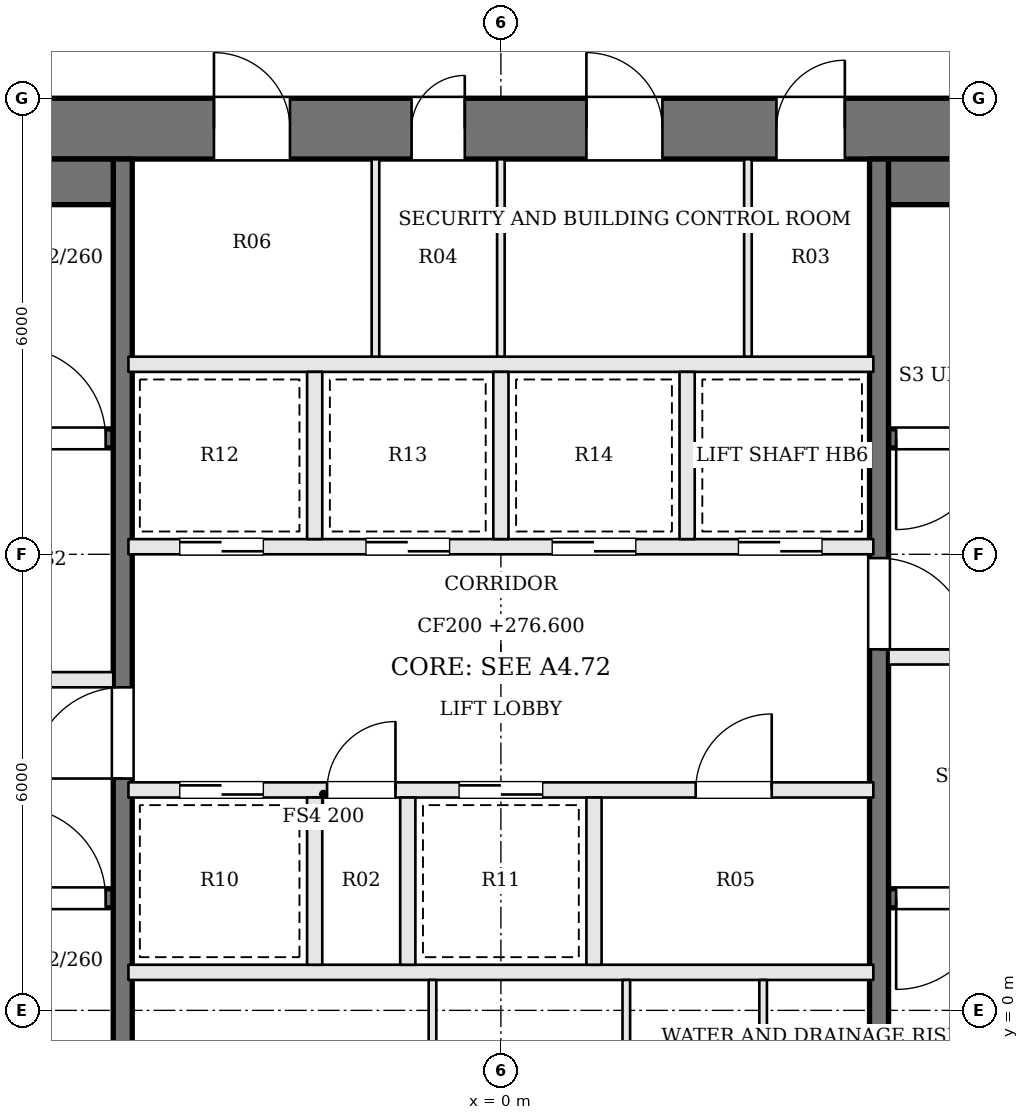
"""IFC4 building model, lengths in metres.
Left out: names, types, materials, properties, quantities, classifications, styles, units other than length and angle.
Written with IfcOpenShell. Run it as: python <this file> out.ifc"""

import sys

from ifc_helpers import new_model, si_unit, direction, frame, frame_2d, origin, place, context, subcontext, project, spatial, rectangle, extrude, element, fill, save


model = new_model("IFC4")
c1 = context("Model", 3, precision=1e-05, world=origin(), true_north=direction((0.0, 1.0)))
c2 = subcontext(c1, "Body", "Model", "MODEL_VIEW")
j1 = project(units=[si_unit("LENGTHUNIT", "METRE"), si_unit("PLANEANGLEUNIT", "RADIAN")], contexts=[c1])
p1 = place(None, origin())
s1 = spatial("IfcSite", under=j1, at=p1, CompositionType="ELEMENT")
p2 = place(p1, origin())
s2 = spatial("IfcBuilding", under=s1, at=p2, CompositionType="ELEMENT")
p3 = place(p2, frame((0.0, 0.0, 276.6)))
s3 = spatial("IfcBuildingStorey", under=s2, at=p3, CompositionType="ELEMENT", Elevation=276.6)
p4 = place(p3, frame((-13.0, 11.6, 0.0), z_axis=(0.0, 0.0, 1.0), x_axis=(1.0, 0.0, 0.0)))
e1 = element("IfcWall", 1, at=p4, inside=s3, PredefinedType="SHEAR", context=c2, shape_type="SweptSolid", body=[
    extrude(rectangle(XDim=26.0, YDim=0.8, at=frame_2d((13.0, 0.0))), origin(), (0.0, 0.0, 1.0), 3.9),
])
p5 = place(p4, frame((9.225, 0.0, 0.0)))
e2 = element("IfcOpeningElement", 2, at=p5, cuts=e1, PredefinedType="OPENING", context=c2, shape_type="SweptSolid", body=[
    extrude(rectangle(XDim=1.0, YDim=2.1, at=frame_2d((0.5, 1.05))), frame((0.0, 0.41, 0.0), z_axis=(0.0, -1.0, 0.0), x_axis=(1.0, 0.0, 0.0)), (0.0, 0.0, 1.0), 0.82),
])
p6 = place(p4, frame((11.825, 0.0, 0.0)))
e3 = element("IfcOpeningElement", 3, at=p6, cuts=e1, PredefinedType="OPENING", context=c2, shape_type="SweptSolid", body=[
    extrude(rectangle(XDim=0.7, YDim=2.1, at=frame_2d((0.35, 1.05))), frame((0.0, 0.41, 0.0), z_axis=(0.0, -1.0, 0.0), x_axis=(1.0, 0.0, 0.0)), (0.0, 0.0, 1.0), 0.82),
])
p7 = place(p4, frame((14.125, 0.0, 0.0)))
e4 = element("IfcOpeningElement", 4, at=p7, cuts=e1, PredefinedType="OPENING", context=c2, shape_type="SweptSolid", body=[
    extrude(rectangle(XDim=1.0, YDim=2.1, at=frame_2d((0.5, 1.05))), frame((0.0, 0.41, 0.0), z_axis=(0.0, -1.0, 0.0), x_axis=(1.0, 0.0, 0.0)), (0.0, 0.0, 1.0), 0.82),
])
p8 = place(p4, frame((16.625, 0.0, 0.0)))
e5 = element("IfcOpeningElement", 5, at=p8, cuts=e1, PredefinedType="OPENING", context=c2, shape_type="SweptSolid", body=[
    extrude(rectangle(XDim=0.9, YDim=2.1, at=frame_2d((0.45, 1.05))), frame((0.0, 0.41, 0.0), z_axis=(0.0, -1.0, 0.0), x_axis=(1.0, 0.0, 0.0)), (0.0, 0.0, 1.0), 0.82),
])
p9 = place(p3, frame((-12.2, 1.475, 0.0), z_axis=(0.0, 0.0, 1.0), x_axis=(1.0, 0.0, 0.0)))
e6 = element("IfcWall", 6, at=p9, inside=s3, PredefinedType="SOLIDWALL", context=c2, shape_type="SweptSolid", body=[
    extrude(rectangle(XDim=7.1, YDim=0.25, at=frame_2d((3.55, 0.0))), origin(), (0.0, 0.0, 1.0), 3.7),
])
p10 = place(p9, frame((5.8, 0.0, 0.0)))
e7 = element("IfcOpeningElement", 7, at=p10, cuts=e6, PredefinedType="OPENING", context=c2, shape_type="SweptSolid", body=[
    extrude(rectangle(XDim=1.2, YDim=2.1, at=frame_2d((0.6, 1.05))), frame((0.0, 0.135, 0.0), z_axis=(0.0, -1.0, 0.0), x_axis=(1.0, 0.0, 0.0)), (0.0, 0.0, 1.0), 0.27),
])
p11 = place(p3, frame((12.2, 7.525, 0.0), z_axis=(0.0, 0.0, 1.0), x_axis=(-1.0, 0.0, 0.0)))
e8 = element("IfcWall", 8, at=p11, inside=s3, PredefinedType="SOLIDWALL", context=c2, shape_type="SweptSolid", body=[
    extrude(rectangle(XDim=7.1, YDim=0.25, at=frame_2d((3.55, 0.0))), origin(), (0.0, 0.0, 1.0), 3.7),
])
p12 = place(p11, frame((5.8, 0.0, 0.0)))
e9 = element("IfcOpeningElement", 9, at=p12, cuts=e8, PredefinedType="OPENING", context=c2, shape_type="SweptSolid", body=[
    extrude(rectangle(XDim=1.2, YDim=2.1, at=frame_2d((0.6, 1.05))), frame((0.0, 0.135, 0.0), z_axis=(0.0, -1.0, 0.0), x_axis=(1.0, 0.0, 0.0)), (0.0, 0.0, 1.0), 0.27),
])
p13 = place(p3, frame((-12.2, 4.35, 0.0), z_axis=(0.0, 0.0, 1.0), x_axis=(1.0, 0.0, 0.0)))
e10 = element("IfcWall", 10, at=p13, inside=s3, PredefinedType="SOLIDWALL", context=c2, shape_type="SweptSolid", body=[
    extrude(rectangle(XDim=7.1, YDim=0.2, at=frame_2d((3.55, 0.0))), origin(), (0.0, 0.0, 1.0), 3.7),
])
p14 = place(p13, frame((4.4, 0.0, 0.0)))
e11 = element("IfcOpeningElement", 11, at=p14, cuts=e10, PredefinedType="OPENING", context=c2, shape_type="SweptSolid", body=[
    extrude(rectangle(XDim=1.2, YDim=2.1, at=frame_2d((0.6, 1.05))), frame((0.0, 0.11, 0.0), z_axis=(0.0, -1.0, 0.0), x_axis=(1.0, 0.0, 0.0)), (0.0, 0.0, 1.0), 0.22),
])
p15 = place(p13, frame((1.1, 0.0, 0.0)))
e12 = element("IfcOpeningElement", 12, at=p15, cuts=e10, PredefinedType="OPENING", context=c2, shape_type="SweptSolid", body=[
    extrude(rectangle(XDim=1.2, YDim=2.1, at=frame_2d((0.6, 1.05))), frame((0.0, 0.11, 0.0), z_axis=(0.0, -1.0, 0.0), x_axis=(1.0, 0.0, 0.0)), (0.0, 0.0, 1.0), 0.22),
])
p16 = place(p3, frame((12.2, 4.65, 0.0), z_axis=(0.0, 0.0, 1.0), x_axis=(-1.0, 0.0, 0.0)))
e13 = element("IfcWall", 13, at=p16, inside=s3, PredefinedType="SOLIDWALL", context=c2, shape_type="SweptSolid", body=[
    extrude(rectangle(XDim=7.1, YDim=0.2, at=frame_2d((3.55, 0.0))), origin(), (0.0, 0.0, 1.0), 3.7),
])
p17 = place(p16, frame((4.4, 0.0, 0.0)))
e14 = element("IfcOpeningElement", 14, at=p17, cuts=e13, PredefinedType="OPENING", context=c2, shape_type="SweptSolid", body=[
    extrude(rectangle(XDim=1.2, YDim=2.1, at=frame_2d((0.6, 1.05))), frame((0.0, 0.11, 0.0), z_axis=(0.0, -1.0, 0.0), x_axis=(1.0, 0.0, 0.0)), (0.0, 0.0, 1.0), 0.22),
])
p18 = place(p16, frame((1.1, 0.0, 0.0)))
e15 = element("IfcOpeningElement", 15, at=p18, cuts=e13, PredefinedType="OPENING", context=c2, shape_type="SweptSolid", body=[
    extrude(rectangle(XDim=1.2, YDim=2.1, at=frame_2d((0.6, 1.05))), frame((0.0, 0.11, 0.0), z_axis=(0.0, -1.0, 0.0), x_axis=(1.0, 0.0, 0.0)), (0.0, 0.0, 1.0), 0.22),
])
p19 = place(p3, frame((-12.2, 7.525, 0.0), z_axis=(0.0, 0.0, 1.0), x_axis=(1.0, 0.0, 0.0)))
e16 = element("IfcWall", 16, at=p19, inside=s3, PredefinedType="SOLIDWALL", context=c2, shape_type="SweptSolid", body=[
    extrude(rectangle(XDim=7.1, YDim=0.25, at=frame_2d((3.55, 0.0))), origin(), (0.0, 0.0, 1.0), 3.7),
])
p20 = place(p19, frame((5.8, 0.0, 0.0)))
e17 = element("IfcOpeningElement", 17, at=p20, cuts=e16, PredefinedType="OPENING", context=c2, shape_type="SweptSolid", body=[
    extrude(rectangle(XDim=1.2, YDim=2.1, at=frame_2d((0.6, 1.05))), frame((0.0, 0.135, 0.0), z_axis=(0.0, -1.0, 0.0), x_axis=(1.0, 0.0, 0.0)), (0.0, 0.0, 1.0), 0.27),
])
p21 = place(p3, frame((12.2, 1.475, 0.0), z_axis=(0.0, 0.0, 1.0), x_axis=(-1.0, 0.0, 0.0)))
e18 = element("IfcWall", 18, at=p21, inside=s3, PredefinedType="SOLIDWALL", context=c2, shape_type="SweptSolid", body=[
    extrude(rectangle(XDim=7.1, YDim=0.25, at=frame_2d((3.55, 0.0))), origin(), (0.0, 0.0, 1.0), 3.7),
])
p22 = place(p21, frame((5.8, 0.0, 0.0)))
e19 = element("IfcOpeningElement", 19, at=p22, cuts=e18, PredefinedType="OPENING", context=c2, shape_type="SweptSolid", body=[
    extrude(rectangle(XDim=1.2, YDim=2.1, at=frame_2d((0.6, 1.05))), frame((0.0, 0.135, 0.0), z_axis=(0.0, -1.0, 0.0), x_axis=(1.0, 0.0, 0.0)), (0.0, 0.0, 1.0), 0.27),
])
p23 = place(p3, frame((-4.975, -2.2, 0.0), z_axis=(0.0, 0.0, 1.0), x_axis=(0.0, 1.0, 0.0)))
e20 = element("IfcWall", 20, at=p23, inside=s3, PredefinedType="SOLIDWALL", context=c2, shape_type="SweptSolid", body=[
    extrude(rectangle(XDim=13.4, YDim=0.25, at=frame_2d((6.7, 0.0))), origin(), (0.0, 0.0, 1.0), 3.7),
])
p24 = place(p23, frame((5.25, 0.0, 0.0)))
e21 = element("IfcOpeningElement", 21, at=p24, cuts=e20, PredefinedType="OPENING", context=c2, shape_type="SweptSolid", body=[
    extrude(rectangle(XDim=1.2, YDim=2.1, at=frame_2d((0.6, 1.05))), frame((0.0, 0.135, 0.0), z_axis=(0.0, -1.0, 0.0), x_axis=(1.0, 0.0, 0.0)), (0.0, 0.0, 1.0), 0.27),
])
p25 = place(p3, frame((4.975, 11.2, 0.0), z_axis=(0.0, 0.0, 1.0), x_axis=(0.0, -1.0, 0.0)))
e22 = element("IfcWall", 22, at=p25, inside=s3, PredefinedType="SOLIDWALL", context=c2, shape_type="SweptSolid", body=[
    extrude(rectangle(XDim=13.4, YDim=0.25, at=frame_2d((6.7, 0.0))), origin(), (0.0, 0.0, 1.0), 3.7),
])
p26 = place(p25, frame((5.25, 0.0, 0.0)))
e23 = element("IfcOpeningElement", 23, at=p26, cuts=e22, PredefinedType="OPENING", context=c2, shape_type="SweptSolid", body=[
    extrude(rectangle(XDim=1.2, YDim=2.1, at=frame_2d((0.6, 1.05))), frame((0.0, 0.135, 0.0), z_axis=(0.0, -1.0, 0.0), x_axis=(1.0, 0.0, 0.0)), (0.0, 0.0, 1.0), 0.27),
])
for number, where, z_axis, x_axis in (
    (24, (-12.2, 10.9, 0.0), (0.0, 0.0, 1.0), (1.0, 0.0, 0.0)),
    (25, (12.2, 10.9, 0.0), (0.0, 0.0, 1.0), (-1.0, 0.0, 0.0)),
):
    element("IfcWall", number, at=place(p3, frame(where, z_axis=z_axis, x_axis=x_axis)), inside=s3, PredefinedType="SOLIDWALL", context=c2, shape_type="SweptSolid", body=[
        extrude(rectangle(XDim=7.1, YDim=0.6, at=frame_2d((3.55, 0.0))), origin(), (0.0, 0.0, 1.0), 3.7),
    ])
p27 = place(p3, frame((-4.9, 0.5, 0.0), z_axis=(0.0, 0.0, 1.0), x_axis=(1.0, 0.0, 0.0)))
e26 = element("IfcWall", 26, at=p27, inside=s3, PredefinedType="SOLIDWALL", context=c2, shape_type="SweptSolid", body=[
    extrude(rectangle(XDim=9.8, YDim=0.2, at=frame_2d((4.9, 0.0))), origin(), (0.0, 0.0, 1.0), 3.7),
])
p28 = place(p3, frame((-4.9, 2.9, 0.0), z_axis=(0.0, 0.0, 1.0), x_axis=(1.0, 0.0, 0.0)))
e27 = element("IfcWall", 27, at=p28, inside=s3, PredefinedType="SOLIDWALL", context=c2, shape_type="SweptSolid", body=[
    extrude(rectangle(XDim=9.8, YDim=0.2, at=frame_2d((4.9, 0.0))), origin(), (0.0, 0.0, 1.0), 3.7),
])
p29 = place(p28, frame((0.675, 0.0, 0.0)))
e28 = element("IfcOpeningElement", 28, at=p29, cuts=e27, PredefinedType="OPENING", context=c2, shape_type="SweptSolid", body=[
    extrude(rectangle(XDim=1.1, YDim=2.1, at=frame_2d((0.55, 1.05))), frame((0.0, 0.11, 0.0), z_axis=(0.0, -1.0, 0.0), x_axis=(1.0, 0.0, 0.0)), (0.0, 0.0, 1.0), 0.22),
])
p30 = place(p28, frame((2.613, 0.0, 0.0)))
e29 = element("IfcOpeningElement", 29, at=p30, cuts=e27, PredefinedType="OPENING", context=c2, shape_type="SweptSolid", body=[
    extrude(rectangle(XDim=0.9, YDim=2.1, at=frame_2d((0.45, 1.05))), frame((0.0, 0.11, 0.0), z_axis=(0.0, -1.0, 0.0), x_axis=(1.0, 0.0, 0.0)), (0.0, 0.0, 1.0), 0.22),
])
p31 = place(p28, frame((4.35, 0.0, 0.0)))
e30 = element("IfcOpeningElement", 30, at=p31, cuts=e27, PredefinedType="OPENING", context=c2, shape_type="SweptSolid", body=[
    extrude(rectangle(XDim=1.1, YDim=2.1, at=frame_2d((0.55, 1.05))), frame((0.0, 0.11, 0.0), z_axis=(0.0, -1.0, 0.0), x_axis=(1.0, 0.0, 0.0)), (0.0, 0.0, 1.0), 0.22),
])
p32 = place(p28, frame((7.463, 0.0, 0.0)))
e31 = element("IfcOpeningElement", 31, at=p32, cuts=e27, PredefinedType="OPENING", context=c2, shape_type="SweptSolid", body=[
    extrude(rectangle(XDim=1.0, YDim=2.1, at=frame_2d((0.5, 1.05))), frame((0.0, 0.11, 0.0), z_axis=(0.0, -1.0, 0.0), x_axis=(1.0, 0.0, 0.0)), (0.0, 0.0, 1.0), 0.22),
])
p33 = place(p3, frame((-4.9, 6.1, 0.0), z_axis=(0.0, 0.0, 1.0), x_axis=(1.0, 0.0, 0.0)))
e32 = element("IfcWall", 32, at=p33, inside=s3, PredefinedType="SOLIDWALL", context=c2, shape_type="SweptSolid", body=[
    extrude(rectangle(XDim=9.8, YDim=0.2, at=frame_2d((4.9, 0.0))), origin(), (0.0, 0.0, 1.0), 3.7),
])
p34 = place(p33, frame((0.675, 0.0, 0.0)))
e33 = element("IfcOpeningElement", 33, at=p34, cuts=e32, PredefinedType="OPENING", context=c2, shape_type="SweptSolid", body=[
    extrude(rectangle(XDim=1.1, YDim=2.1, at=frame_2d((0.55, 1.05))), frame((0.0, 0.11, 0.0), z_axis=(0.0, -1.0, 0.0), x_axis=(1.0, 0.0, 0.0)), (0.0, 0.0, 1.0), 0.22),
])
p35 = place(p33, frame((3.125, 0.0, 0.0)))
e34 = element("IfcOpeningElement", 34, at=p35, cuts=e32, PredefinedType="OPENING", context=c2, shape_type="SweptSolid", body=[
    extrude(rectangle(XDim=1.1, YDim=2.1, at=frame_2d((0.55, 1.05))), frame((0.0, 0.11, 0.0), z_axis=(0.0, -1.0, 0.0), x_axis=(1.0, 0.0, 0.0)), (0.0, 0.0, 1.0), 0.22),
])
p36 = place(p33, frame((5.575, 0.0, 0.0)))
e35 = element("IfcOpeningElement", 35, at=p36, cuts=e32, PredefinedType="OPENING", context=c2, shape_type="SweptSolid", body=[
    extrude(rectangle(XDim=1.1, YDim=2.1, at=frame_2d((0.55, 1.05))), frame((0.0, 0.11, 0.0), z_axis=(0.0, -1.0, 0.0), x_axis=(1.0, 0.0, 0.0)), (0.0, 0.0, 1.0), 0.22),
])
p37 = place(p33, frame((8.025, 0.0, 0.0)))
e36 = element("IfcOpeningElement", 36, at=p37, cuts=e32, PredefinedType="OPENING", context=c2, shape_type="SweptSolid", body=[
    extrude(rectangle(XDim=1.1, YDim=2.1, at=frame_2d((0.55, 1.05))), frame((0.0, 0.11, 0.0), z_axis=(0.0, -1.0, 0.0), x_axis=(1.0, 0.0, 0.0)), (0.0, 0.0, 1.0), 0.22),
])
p38 = place(p3, frame((-4.9, 8.5, 0.0), z_axis=(0.0, 0.0, 1.0), x_axis=(1.0, 0.0, 0.0)))
e37 = element("IfcWall", 37, at=p38, inside=s3, PredefinedType="SOLIDWALL", context=c2, shape_type="SweptSolid", body=[
    extrude(rectangle(XDim=9.8, YDim=0.2, at=frame_2d((4.9, 0.0))), origin(), (0.0, 0.0, 1.0), 3.7),
])
for number, where, z_axis, x_axis in (
    (38, (-2.45, 0.6, 0.0), (0.0, 0.0, 1.0), (0.0, 1.0, 0.0)),
    (39, (-1.225, 0.6, 0.0), (0.0, 0.0, 1.0), (0.0, 1.0, 0.0)),
    (40, (1.225, 0.6, 0.0), (0.0, 0.0, 1.0), (0.0, 1.0, 0.0)),
    (41, (-2.45, 6.2, 0.0), (0.0, 0.0, 1.0), (0.0, 1.0, 0.0)),
    (42, (0.0, 6.2, 0.0), (0.0, 0.0, 1.0), (0.0, 1.0, 0.0)),
    (43, (2.45, 6.2, 0.0), (0.0, 0.0, 1.0), (0.0, 1.0, 0.0)),
):
    element("IfcWall", number, at=place(p3, frame(where, z_axis=z_axis, x_axis=x_axis)), inside=s3, PredefinedType="SOLIDWALL", context=c2, shape_type="SweptSolid", body=[
        extrude(rectangle(XDim=2.2, YDim=0.2, at=frame_2d((1.1, 0.0))), origin(), (0.0, 0.0, 1.0), 3.7),
    ])
for number, where, z_axis, x_axis in (
    (44, (-0.9, -2.2, 0.0), (0.0, 0.0, 1.0), (0.0, 1.0, 0.0)),
    (45, (1.65, -2.2, 0.0), (0.0, 0.0, 1.0), (0.0, 1.0, 0.0)),
    (46, (3.45, -2.2, 0.0), (0.0, 0.0, 1.0), (0.0, 1.0, 0.0)),
    (47, (-1.65, 8.6, 0.0), (0.0, 0.0, 1.0), (0.0, 1.0, 0.0)),
    (48, (0.0, 8.6, 0.0), (0.0, 0.0, 1.0), (0.0, 1.0, 0.0)),
    (49, (3.25, 8.6, 0.0), (0.0, 0.0, 1.0), (0.0, 1.0, 0.0)),
):
    element("IfcWall", number, at=place(p3, frame(where, z_axis=z_axis, x_axis=x_axis)), inside=s3, PredefinedType="PARTITIONING", context=c2, shape_type="SweptSolid", body=[
        extrude(rectangle(XDim=2.6, YDim=0.1, at=frame_2d((1.3, 0.0))), origin(), (0.0, 0.0, 1.0), 3.7),
    ])
p39 = place(p24, origin())
e50 = element("IfcDoor", 50, at=p39, inside=s3, OperationType="SINGLE_SWING_LEFT", PredefinedType="DOOR", context=c2, shape_type="SweptSolid", body=[
    extrude(rectangle(XDim=1.2, YDim=2.1, at=frame_2d((0.6, 1.05))), frame((0.0, 0.025, 0.0), z_axis=(0.0, -1.0, 0.0), x_axis=(1.0, 0.0, 0.0)), (0.0, 0.0, 1.0), 0.05),
])
fill(e21, e50)
p40 = place(p26, origin())
e51 = element("IfcDoor", 51, at=p40, inside=s3, OperationType="SINGLE_SWING_RIGHT", PredefinedType="DOOR", context=c2, shape_type="SweptSolid", body=[
    extrude(rectangle(XDim=1.2, YDim=2.1, at=frame_2d((0.6, 1.05))), frame((0.0, 0.025, 0.0), z_axis=(0.0, -1.0, 0.0), x_axis=(1.0, 0.0, 0.0)), (0.0, 0.0, 1.0), 0.05),
])
fill(e23, e51)
p41 = place(p10, origin())
e52 = element("IfcDoor", 52, at=p41, inside=s3, OperationType="SINGLE_SWING_LEFT", PredefinedType="DOOR", context=c2, shape_type="SweptSolid", body=[
    extrude(rectangle(XDim=1.2, YDim=2.1, at=frame_2d((0.6, 1.05))), frame((0.0, 0.025, 0.0), z_axis=(0.0, -1.0, 0.0), x_axis=(1.0, 0.0, 0.0)), (0.0, 0.0, 1.0), 0.05),
])
fill(e7, e52)
p42 = place(p12, origin())
e53 = element("IfcDoor", 53, at=p42, inside=s3, OperationType="SINGLE_SWING_RIGHT", PredefinedType="DOOR", context=c2, shape_type="SweptSolid", body=[
    extrude(rectangle(XDim=1.2, YDim=2.1, at=frame_2d((0.6, 1.05))), frame((0.0, 0.025, 0.0), z_axis=(0.0, -1.0, 0.0), x_axis=(1.0, 0.0, 0.0)), (0.0, 0.0, 1.0), 0.05),
])
fill(e9, e53)
p43 = place(p20, origin())
e54 = element("IfcDoor", 54, at=p43, inside=s3, OperationType="SINGLE_SWING_LEFT", PredefinedType="DOOR", context=c2, shape_type="SweptSolid", body=[
    extrude(rectangle(XDim=1.2, YDim=2.1, at=frame_2d((0.6, 1.05))), frame((0.0, 0.025, 0.0), z_axis=(0.0, -1.0, 0.0), x_axis=(1.0, 0.0, 0.0)), (0.0, 0.0, 1.0), 0.05),
])
fill(e17, e54)
p44 = place(p22, origin())
e55 = element("IfcDoor", 55, at=p44, inside=s3, OperationType="SINGLE_SWING_RIGHT", PredefinedType="DOOR", context=c2, shape_type="SweptSolid", body=[
    extrude(rectangle(XDim=1.2, YDim=2.1, at=frame_2d((0.6, 1.05))), frame((0.0, 0.025, 0.0), z_axis=(0.0, -1.0, 0.0), x_axis=(1.0, 0.0, 0.0)), (0.0, 0.0, 1.0), 0.05),
])
fill(e19, e55)
p45 = place(p29, origin())
e56 = element("IfcDoor", 56, at=p45, inside=s3, OperationType="SLIDING_TO_RIGHT", PredefinedType="DOOR", context=c2, shape_type="SweptSolid", body=[
    extrude(rectangle(XDim=1.1, YDim=2.1, at=frame_2d((0.55, 1.05))), frame((0.0, 0.025, 0.0), z_axis=(0.0, -1.0, 0.0), x_axis=(1.0, 0.0, 0.0)), (0.0, 0.0, 1.0), 0.05),
])
fill(e28, e56)
p46 = place(p30, origin())
e57 = element("IfcDoor", 57, at=p46, inside=s3, OperationType="SINGLE_SWING_RIGHT", PredefinedType="DOOR", context=c2, shape_type="SweptSolid", body=[
    extrude(rectangle(XDim=0.9, YDim=2.1, at=frame_2d((0.45, 1.05))), frame((0.0, 0.025, 0.0), z_axis=(0.0, -1.0, 0.0), x_axis=(1.0, 0.0, 0.0)), (0.0, 0.0, 1.0), 0.05),
])
fill(e29, e57)
p47 = place(p31, origin())
e58 = element("IfcDoor", 58, at=p47, inside=s3, OperationType="SLIDING_TO_LEFT", PredefinedType="DOOR", context=c2, shape_type="SweptSolid", body=[
    extrude(rectangle(XDim=1.1, YDim=2.1, at=frame_2d((0.55, 1.05))), frame((0.0, 0.025, 0.0), z_axis=(0.0, -1.0, 0.0), x_axis=(1.0, 0.0, 0.0)), (0.0, 0.0, 1.0), 0.05),
])
fill(e30, e58)
p48 = place(p32, origin())
e59 = element("IfcDoor", 59, at=p48, inside=s3, OperationType="SINGLE_SWING_RIGHT", PredefinedType="DOOR", context=c2, shape_type="SweptSolid", body=[
    extrude(rectangle(XDim=1.0, YDim=2.1, at=frame_2d((0.5, 1.05))), frame((0.0, 0.025, 0.0), z_axis=(0.0, -1.0, 0.0), x_axis=(1.0, 0.0, 0.0)), (0.0, 0.0, 1.0), 0.05),
])
fill(e31, e59)
p49 = place(p34, origin())
e60 = element("IfcDoor", 60, at=p49, inside=s3, OperationType="SLIDING_TO_RIGHT", PredefinedType="DOOR", context=c2, shape_type="SweptSolid", body=[
    extrude(rectangle(XDim=1.1, YDim=2.1, at=frame_2d((0.55, 1.05))), frame((0.0, 0.025, 0.0), z_axis=(0.0, -1.0, 0.0), x_axis=(1.0, 0.0, 0.0)), (0.0, 0.0, 1.0), 0.05),
])
fill(e33, e60)
p50 = place(p35, origin())
e61 = element("IfcDoor", 61, at=p50, inside=s3, OperationType="SLIDING_TO_LEFT", PredefinedType="DOOR", context=c2, shape_type="SweptSolid", body=[
    extrude(rectangle(XDim=1.1, YDim=2.1, at=frame_2d((0.55, 1.05))), frame((0.0, 0.025, 0.0), z_axis=(0.0, -1.0, 0.0), x_axis=(1.0, 0.0, 0.0)), (0.0, 0.0, 1.0), 0.05),
])
fill(e34, e61)
p51 = place(p36, origin())
e62 = element("IfcDoor", 62, at=p51, inside=s3, OperationType="SLIDING_TO_RIGHT", PredefinedType="DOOR", context=c2, shape_type="SweptSolid", body=[
    extrude(rectangle(XDim=1.1, YDim=2.1, at=frame_2d((0.55, 1.05))), frame((0.0, 0.025, 0.0), z_axis=(0.0, -1.0, 0.0), x_axis=(1.0, 0.0, 0.0)), (0.0, 0.0, 1.0), 0.05),
])
fill(e35, e62)
p52 = place(p37, origin())
e63 = element("IfcDoor", 63, at=p52, inside=s3, OperationType="SLIDING_TO_LEFT", PredefinedType="DOOR", context=c2, shape_type="SweptSolid", body=[
    extrude(rectangle(XDim=1.1, YDim=2.1, at=frame_2d((0.55, 1.05))), frame((0.0, 0.025, 0.0), z_axis=(0.0, -1.0, 0.0), x_axis=(1.0, 0.0, 0.0)), (0.0, 0.0, 1.0), 0.05),
])
fill(e36, e63)
p53 = place(p5, origin())
e64 = element("IfcDoor", 64, at=p53, inside=s3, OperationType="SINGLE_SWING_LEFT", PredefinedType="DOOR", context=c2, shape_type="SweptSolid", body=[
    extrude(rectangle(XDim=1.0, YDim=2.1, at=frame_2d((0.5, 1.05))), frame((0.0, 0.025, 0.0), z_axis=(0.0, -1.0, 0.0), x_axis=(1.0, 0.0, 0.0)), (0.0, 0.0, 1.0), 0.05),
])
fill(e2, e64)
p54 = place(p6, origin())
e65 = element("IfcDoor", 65, at=p54, inside=s3, OperationType="SINGLE_SWING_RIGHT", PredefinedType="DOOR", context=c2, shape_type="SweptSolid", body=[
    extrude(rectangle(XDim=0.7, YDim=2.1, at=frame_2d((0.35, 1.05))), frame((0.0, 0.025, 0.0), z_axis=(0.0, -1.0, 0.0), x_axis=(1.0, 0.0, 0.0)), (0.0, 0.0, 1.0), 0.05),
])
fill(e3, e65)
p55 = place(p7, origin())
e66 = element("IfcDoor", 66, at=p55, inside=s3, OperationType="SINGLE_SWING_LEFT", PredefinedType="DOOR", context=c2, shape_type="SweptSolid", body=[
    extrude(rectangle(XDim=1.0, YDim=2.1, at=frame_2d((0.5, 1.05))), frame((0.0, 0.025, 0.0), z_axis=(0.0, -1.0, 0.0), x_axis=(1.0, 0.0, 0.0)), (0.0, 0.0, 1.0), 0.05),
])
fill(e4, e66)
p56 = place(p8, origin())
e67 = element("IfcDoor", 67, at=p56, inside=s3, OperationType="SINGLE_SWING_RIGHT", PredefinedType="DOOR", context=c2, shape_type="SweptSolid", body=[
    extrude(rectangle(XDim=0.9, YDim=2.1, at=frame_2d((0.45, 1.05))), frame((0.0, 0.025, 0.0), z_axis=(0.0, -1.0, 0.0), x_axis=(1.0, 0.0, 0.0)), (0.0, 0.0, 1.0), 0.05),
])
fill(e5, e67)
save(model, sys.argv[1])
